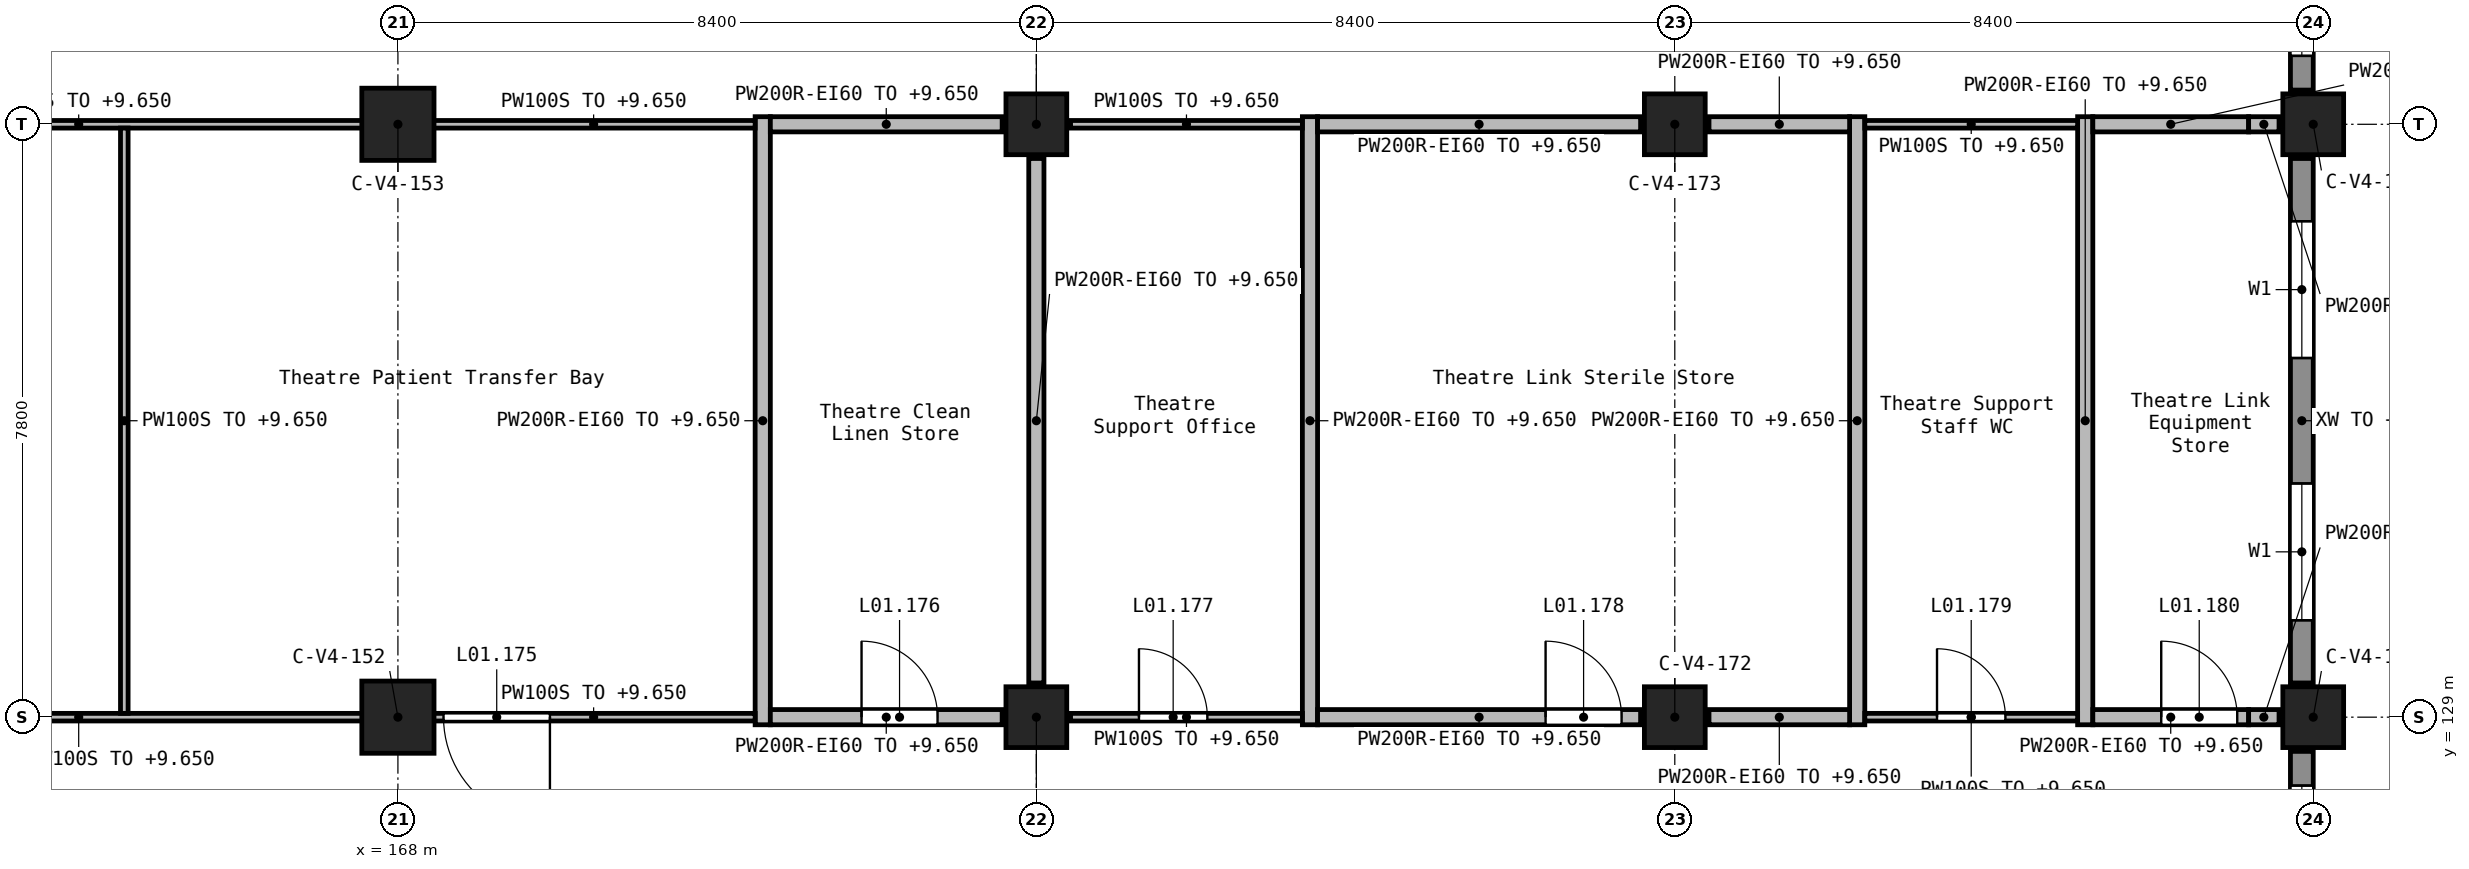
"""IFC4 building model, lengths in metres.
Left out: names, types, materials, properties, quantities, classifications, styles, units other than length and angle.
Written with IfcOpenShell. Run it as: python <this file> out.ifc"""

import sys

from ifc_helpers import new_model, si_unit, direction, frame, frame_2d, origin, origin_2d, place, context, subcontext, project, spatial, rectangle, extrude, element, fill, save


model = new_model("IFC4")
c1 = context("Model", 3, precision=1e-05, world=origin(), true_north=direction((0.0, 1.0)))
c2 = subcontext(c1, "Body", "Model", "MODEL_VIEW")
j1 = project(units=[si_unit("LENGTHUNIT", "METRE"), si_unit("PLANEANGLEUNIT", "RADIAN")], contexts=[c1])
p1 = place(None, origin())
s1 = spatial("IfcSite", under=j1, at=p1, CompositionType="ELEMENT")
p2 = place(p1, origin())
s2 = spatial("IfcBuilding", under=s1, at=p2, CompositionType="ELEMENT")
p3 = place(p2, frame((0.0, 0.0, 5.4)))
s3 = spatial("IfcBuildingStorey", under=s2, at=p3, CompositionType="ELEMENT", Elevation=5.4)
for number, where, z_axis, x_axis in (
    (1, (168.0, 129.0, 0.0), (0.0, 0.0, 1.0), (1.0, 0.0, 0.0)),
    (2, (168.0, 136.8, 0.0), (0.0, 0.0, 1.0), (1.0, 0.0, 0.0)),
):
    element("IfcColumn", number, at=place(p3, frame(where, z_axis=z_axis, x_axis=x_axis)), inside=s3, PredefinedType="COLUMN", context=c2, shape_type="SweptSolid", body=[
        extrude(rectangle(XDim=0.95, YDim=0.95, at=origin_2d()), origin(), (0.0, 0.0, 1.0), 4.5),
    ])
for number, where, z_axis, x_axis in (
    (3, (176.4, 129.0, 0.0), (0.0, 0.0, 1.0), (1.0, 0.0, 0.0)),
    (4, (176.4, 136.8, 0.0), (0.0, 0.0, 1.0), (1.0, 0.0, 0.0)),
    (5, (184.8, 129.0, 0.0), (0.0, 0.0, 1.0), (1.0, 0.0, 0.0)),
    (6, (184.8, 136.8, 0.0), (0.0, 0.0, 1.0), (1.0, 0.0, 0.0)),
    (7, (193.2, 129.0, 0.0), (0.0, 0.0, 1.0), (1.0, 0.0, 0.0)),
    (8, (193.2, 136.8, 0.0), (0.0, 0.0, 1.0), (1.0, 0.0, 0.0)),
):
    element("IfcColumn", number, at=place(p3, frame(where, z_axis=z_axis, x_axis=x_axis)), inside=s3, PredefinedType="COLUMN", context=c2, shape_type="SweptSolid", body=[
        extrude(rectangle(XDim=0.8, YDim=0.8, at=origin_2d()), origin(), (0.0, 0.0, 1.0), 4.5),
    ])
p4 = place(p3, frame((193.05, 125.85, 0.0), z_axis=(0.0, 0.0, 1.0), x_axis=(0.0, 1.0, 0.0)))
e9 = element("IfcWall", 9, at=p4, inside=s3, PredefinedType="STANDARD", context=c2, shape_type="SweptSolid", body=[
    extrude(rectangle(XDim=2.7, YDim=0.3, at=frame_2d((1.35, 0.0))), origin(), (0.0, 0.0, 1.0), 3.35),
])
p5 = place(p4, frame((0.45, 0.0, 0.9)))
e10 = element("IfcOpeningElement", 10, at=p5, cuts=e9, PredefinedType="OPENING", context=c2, shape_type="SweptSolid", body=[
    extrude(rectangle(XDim=1.8, YDim=1.5, at=frame_2d((0.9, 0.75))), frame((0.0, 0.16, 0.0), z_axis=(0.0, -1.0, 0.0), x_axis=(1.0, 0.0, 0.0)), (0.0, 0.0, 1.0), 0.32),
])
p6 = place(p3, frame((193.05, 129.45, 0.0), z_axis=(0.0, 0.0, 1.0), x_axis=(0.0, 1.0, 0.0)))
e11 = element("IfcWall", 11, at=p6, inside=s3, PredefinedType="STANDARD", context=c2, shape_type="SweptSolid", body=[
    extrude(rectangle(XDim=6.9, YDim=0.3, at=frame_2d((3.45, 0.0))), origin(), (0.0, 0.0, 1.0), 3.35),
])
p7 = place(p6, frame((0.825, 0.0, 0.9)))
e12 = element("IfcOpeningElement", 12, at=p7, cuts=e11, PredefinedType="OPENING", context=c2, shape_type="SweptSolid", body=[
    extrude(rectangle(XDim=1.8, YDim=1.5, at=frame_2d((0.9, 0.75))), frame((0.0, 0.16, 0.0), z_axis=(0.0, -1.0, 0.0), x_axis=(1.0, 0.0, 0.0)), (0.0, 0.0, 1.0), 0.32),
])
p8 = place(p6, frame((4.275, 0.0, 0.9)))
e13 = element("IfcOpeningElement", 13, at=p8, cuts=e11, PredefinedType="OPENING", context=c2, shape_type="SweptSolid", body=[
    extrude(rectangle(XDim=1.8, YDim=1.5, at=frame_2d((0.9, 0.75))), frame((0.0, 0.16, 0.0), z_axis=(0.0, -1.0, 0.0), x_axis=(1.0, 0.0, 0.0)), (0.0, 0.0, 1.0), 0.32),
])
p9 = place(p3, frame((193.05, 137.25, 0.0), z_axis=(0.0, 0.0, 1.0), x_axis=(0.0, 1.0, 0.0)))
e14 = element("IfcWall", 14, at=p9, inside=s3, PredefinedType="STANDARD", context=c2, shape_type="SweptSolid", body=[
    extrude(rectangle(XDim=2.7, YDim=0.3, at=frame_2d((1.35, 0.0))), origin(), (0.0, 0.0, 1.0), 3.35),
])
p10 = place(p9, frame((0.45, 0.0, 0.9)))
e15 = element("IfcOpeningElement", 15, at=p10, cuts=e14, PredefinedType="OPENING", context=c2, shape_type="SweptSolid", body=[
    extrude(rectangle(XDim=1.8, YDim=1.5, at=frame_2d((0.9, 0.75))), frame((0.0, 0.16, 0.0), z_axis=(0.0, -1.0, 0.0), x_axis=(1.0, 0.0, 0.0)), (0.0, 0.0, 1.0), 0.32),
])
p11 = place(p3, frame((172.8, 128.9, 0.0), z_axis=(0.0, 0.0, 1.0), x_axis=(0.0, 1.0, 0.0)))
e16 = element("IfcWall", 16, at=p11, inside=s3, PredefinedType="SOLIDWALL", context=c2, shape_type="SweptSolid", body=[
    extrude(rectangle(XDim=8.0, YDim=0.2, at=frame_2d((4.0, 0.0))), origin(), (0.0, 0.0, 1.0), 4.25),
])
p12 = place(p3, frame((176.4, 129.45, 0.0), z_axis=(0.0, 0.0, 1.0), x_axis=(0.0, 1.0, 0.0)))
e17 = element("IfcWall", 17, at=p12, inside=s3, PredefinedType="SOLIDWALL", context=c2, shape_type="SweptSolid", body=[
    extrude(rectangle(XDim=6.9, YDim=0.2, at=frame_2d((3.45, 0.0))), origin(), (0.0, 0.0, 1.0), 4.25),
])
for number, where, z_axis, x_axis in (
    (18, (180.0, 128.9, 0.0), (0.0, 0.0, 1.0), (0.0, 1.0, 0.0)),
    (19, (187.2, 128.9, 0.0), (0.0, 0.0, 1.0), (0.0, 1.0, 0.0)),
    (20, (190.2, 128.9, 0.0), (0.0, 0.0, 1.0), (0.0, 1.0, 0.0)),
):
    element("IfcWall", number, at=place(p3, frame(where, z_axis=z_axis, x_axis=x_axis)), inside=s3, PredefinedType="SOLIDWALL", context=c2, shape_type="SweptSolid", body=[
        extrude(rectangle(XDim=8.0, YDim=0.2, at=frame_2d((4.0, 0.0))), origin(), (0.0, 0.0, 1.0), 4.25),
    ])
p13 = place(p3, frame((180.1, 129.0, 0.0), z_axis=(0.0, 0.0, 1.0), x_axis=(1.0, 0.0, 0.0)))
e21 = element("IfcWall", 21, at=p13, inside=s3, PredefinedType="SOLIDWALL", context=c2, shape_type="SweptSolid", body=[
    extrude(rectangle(XDim=4.25, YDim=0.2, at=frame_2d((2.125, 0.0))), origin(), (0.0, 0.0, 1.0), 4.25),
])
p14 = place(p13, frame((3.0, 0.0, 0.0)))
e22 = element("IfcOpeningElement", 22, at=p14, cuts=e21, PredefinedType="OPENING", context=c2, shape_type="SweptSolid", body=[
    extrude(rectangle(XDim=1.0, YDim=2.1, at=frame_2d((0.5, 1.05))), frame((0.0, 0.11, 0.0), z_axis=(0.0, -1.0, 0.0), x_axis=(1.0, 0.0, 0.0)), (0.0, 0.0, 1.0), 0.22),
])
p15 = place(p3, frame((185.25, 129.0, 0.0), z_axis=(0.0, 0.0, 1.0), x_axis=(1.0, 0.0, 0.0)))
e23 = element("IfcWall", 23, at=p15, inside=s3, PredefinedType="SOLIDWALL", context=c2, shape_type="SweptSolid", body=[
    extrude(rectangle(XDim=1.85, YDim=0.2, at=frame_2d((0.925, 0.0))), origin(), (0.0, 0.0, 1.0), 4.25),
])
p16 = place(p3, frame((180.1, 136.8, 0.0), z_axis=(0.0, 0.0, 1.0), x_axis=(1.0, 0.0, 0.0)))
e24 = element("IfcWall", 24, at=p16, inside=s3, PredefinedType="SOLIDWALL", context=c2, shape_type="SweptSolid", body=[
    extrude(rectangle(XDim=4.25, YDim=0.2, at=frame_2d((2.125, 0.0))), origin(), (0.0, 0.0, 1.0), 4.25),
])
p17 = place(p3, frame((185.25, 136.8, 0.0), z_axis=(0.0, 0.0, 1.0), x_axis=(1.0, 0.0, 0.0)))
e25 = element("IfcWall", 25, at=p17, inside=s3, PredefinedType="SOLIDWALL", context=c2, shape_type="SweptSolid", body=[
    extrude(rectangle(XDim=1.85, YDim=0.2, at=frame_2d((0.925, 0.0))), origin(), (0.0, 0.0, 1.0), 4.25),
])
p18 = place(p3, frame((172.9, 129.0, 0.0), z_axis=(0.0, 0.0, 1.0), x_axis=(1.0, 0.0, 0.0)))
e26 = element("IfcWall", 26, at=p18, inside=s3, PredefinedType="SOLIDWALL", context=c2, shape_type="SweptSolid", body=[
    extrude(rectangle(XDim=3.05, YDim=0.2, at=frame_2d((1.525, 0.0))), origin(), (0.0, 0.0, 1.0), 4.25),
])
p19 = place(p18, frame((1.2, 0.0, 0.0)))
e27 = element("IfcOpeningElement", 27, at=p19, cuts=e26, PredefinedType="OPENING", context=c2, shape_type="SweptSolid", body=[
    extrude(rectangle(XDim=1.0, YDim=2.1, at=frame_2d((0.5, 1.05))), frame((0.0, 0.11, 0.0), z_axis=(0.0, -1.0, 0.0), x_axis=(1.0, 0.0, 0.0)), (0.0, 0.0, 1.0), 0.22),
])
p20 = place(p3, frame((172.9, 136.8, 0.0), z_axis=(0.0, 0.0, 1.0), x_axis=(1.0, 0.0, 0.0)))
e28 = element("IfcWall", 28, at=p20, inside=s3, PredefinedType="SOLIDWALL", context=c2, shape_type="SweptSolid", body=[
    extrude(rectangle(XDim=3.05, YDim=0.2, at=frame_2d((1.525, 0.0))), origin(), (0.0, 0.0, 1.0), 4.25),
])
p21 = place(p3, frame((190.3, 129.0, 0.0), z_axis=(0.0, 0.0, 1.0), x_axis=(1.0, 0.0, 0.0)))
e29 = element("IfcWall", 29, at=p21, inside=s3, PredefinedType="SOLIDWALL", context=c2, shape_type="SweptSolid", body=[
    extrude(rectangle(XDim=2.05, YDim=0.2, at=frame_2d((1.025, 0.0))), origin(), (0.0, 0.0, 1.0), 4.25),
])
p22 = place(p21, frame((0.9, 0.0, 0.0)))
e30 = element("IfcOpeningElement", 30, at=p22, cuts=e29, PredefinedType="OPENING", context=c2, shape_type="SweptSolid", body=[
    extrude(rectangle(XDim=1.0, YDim=2.1, at=frame_2d((0.5, 1.05))), frame((0.0, 0.11, 0.0), z_axis=(0.0, -1.0, 0.0), x_axis=(1.0, 0.0, 0.0)), (0.0, 0.0, 1.0), 0.22),
])
p23 = place(p3, frame((192.35, 129.0, 0.0), z_axis=(0.0, 0.0, 1.0), x_axis=(1.0, 0.0, 0.0)))
e31 = element("IfcWall", 31, at=p23, inside=s3, PredefinedType="SOLIDWALL", context=c2, shape_type="SweptSolid", body=[
    extrude(rectangle(XDim=0.4, YDim=0.2, at=frame_2d((0.2, 0.0))), origin(), (0.0, 0.0, 1.0), 3.33),
])
p24 = place(p3, frame((190.3, 136.8, 0.0), z_axis=(0.0, 0.0, 1.0), x_axis=(1.0, 0.0, 0.0)))
e32 = element("IfcWall", 32, at=p24, inside=s3, PredefinedType="SOLIDWALL", context=c2, shape_type="SweptSolid", body=[
    extrude(rectangle(XDim=2.05, YDim=0.2, at=frame_2d((1.025, 0.0))), origin(), (0.0, 0.0, 1.0), 4.25),
])
p25 = place(p3, frame((192.35, 136.8, 0.0), z_axis=(0.0, 0.0, 1.0), x_axis=(1.0, 0.0, 0.0)))
e33 = element("IfcWall", 33, at=p25, inside=s3, PredefinedType="SOLIDWALL", context=c2, shape_type="SweptSolid", body=[
    extrude(rectangle(XDim=0.4, YDim=0.2, at=frame_2d((0.2, 0.0))), origin(), (0.0, 0.0, 1.0), 3.33),
])
p26 = place(p3, frame((172.7, 129.0, 0.0), z_axis=(0.0, 0.0, 1.0), x_axis=(-1.0, 0.0, 0.0)))
e34 = element("IfcWall", 34, at=p26, inside=s3, PredefinedType="PARTITIONING", context=c2, shape_type="SweptSolid", body=[
    extrude(rectangle(XDim=4.25, YDim=0.1, at=frame_2d((2.125, 0.0))), origin(), (0.0, 0.0, 1.0), 4.25),
])
p27 = place(p26, frame((2.7, 0.0, 0.0)))
e35 = element("IfcOpeningElement", 35, at=p27, cuts=e34, PredefinedType="OPENING", context=c2, shape_type="SweptSolid", body=[
    extrude(rectangle(XDim=1.4, YDim=2.1, at=frame_2d((0.7, 1.05))), frame((0.0, 0.06, 0.0), z_axis=(0.0, -1.0, 0.0), x_axis=(1.0, 0.0, 0.0)), (0.0, 0.0, 1.0), 0.12),
])
p28 = place(p3, frame((167.55, 129.0, 0.0), z_axis=(0.0, 0.0, 1.0), x_axis=(-1.0, 0.0, 0.0)))
e36 = element("IfcWall", 36, at=p28, inside=s3, PredefinedType="PARTITIONING", context=c2, shape_type="SweptSolid", body=[
    extrude(rectangle(XDim=7.5, YDim=0.1, at=frame_2d((3.75, 0.0))), origin(), (0.0, 0.0, 1.0), 4.25),
])
p29 = place(p28, frame((4.65, 0.0, 0.0)))
e37 = element("IfcOpeningElement", 37, at=p29, cuts=e36, PredefinedType="OPENING", context=c2, shape_type="SweptSolid", body=[
    extrude(rectangle(XDim=1.8, YDim=2.1, at=frame_2d((0.9, 1.05))), frame((0.0, 0.06, 0.0), z_axis=(0.0, -1.0, 0.0), x_axis=(1.0, 0.0, 0.0)), (0.0, 0.0, 1.0), 0.12),
])
p30 = place(p3, frame((172.7, 136.8, 0.0), z_axis=(0.0, 0.0, 1.0), x_axis=(-1.0, 0.0, 0.0)))
e38 = element("IfcWall", 38, at=p30, inside=s3, PredefinedType="PARTITIONING", context=c2, shape_type="SweptSolid", body=[
    extrude(rectangle(XDim=4.25, YDim=0.1, at=frame_2d((2.125, 0.0))), origin(), (0.0, 0.0, 1.0), 4.25),
])
p31 = place(p3, frame((167.55, 136.8, 0.0), z_axis=(0.0, 0.0, 1.0), x_axis=(-1.0, 0.0, 0.0)))
e39 = element("IfcWall", 39, at=p31, inside=s3, PredefinedType="PARTITIONING", context=c2, shape_type="SweptSolid", body=[
    extrude(rectangle(XDim=7.5, YDim=0.1, at=frame_2d((3.75, 0.0))), origin(), (0.0, 0.0, 1.0), 4.25),
])
p32 = place(p3, frame((164.4, 129.05, 0.0), z_axis=(0.0, 0.0, 1.0), x_axis=(0.0, 1.0, 0.0)))
e40 = element("IfcWall", 40, at=p32, inside=s3, PredefinedType="PARTITIONING", context=c2, shape_type="SweptSolid", body=[
    extrude(rectangle(XDim=7.7, YDim=0.1, at=frame_2d((3.85, 0.0))), origin(), (0.0, 0.0, 1.0), 4.25),
])
p33 = place(p3, frame((176.85, 129.0, 0.0), z_axis=(0.0, 0.0, 1.0), x_axis=(1.0, 0.0, 0.0)))
e41 = element("IfcWall", 41, at=p33, inside=s3, PredefinedType="PARTITIONING", context=c2, shape_type="SweptSolid", body=[
    extrude(rectangle(XDim=3.05, YDim=0.1, at=frame_2d((1.525, 0.0))), origin(), (0.0, 0.0, 1.0), 4.25),
])
p34 = place(p33, frame((0.9, 0.0, 0.0)))
e42 = element("IfcOpeningElement", 42, at=p34, cuts=e41, PredefinedType="OPENING", context=c2, shape_type="SweptSolid", body=[
    extrude(rectangle(XDim=0.9, YDim=2.1, at=frame_2d((0.45, 1.05))), frame((0.0, 0.06, 0.0), z_axis=(0.0, -1.0, 0.0), x_axis=(1.0, 0.0, 0.0)), (0.0, 0.0, 1.0), 0.12),
])
p35 = place(p3, frame((176.85, 136.8, 0.0), z_axis=(0.0, 0.0, 1.0), x_axis=(1.0, 0.0, 0.0)))
e43 = element("IfcWall", 43, at=p35, inside=s3, PredefinedType="PARTITIONING", context=c2, shape_type="SweptSolid", body=[
    extrude(rectangle(XDim=3.05, YDim=0.1, at=frame_2d((1.525, 0.0))), origin(), (0.0, 0.0, 1.0), 4.25),
])
p36 = place(p3, frame((187.3, 129.0, 0.0), z_axis=(0.0, 0.0, 1.0), x_axis=(1.0, 0.0, 0.0)))
e44 = element("IfcWall", 44, at=p36, inside=s3, PredefinedType="PARTITIONING", context=c2, shape_type="SweptSolid", body=[
    extrude(rectangle(XDim=2.8, YDim=0.1, at=frame_2d((1.4, 0.0))), origin(), (0.0, 0.0, 1.0), 4.25),
])
p37 = place(p36, frame((0.95, 0.0, 0.0)))
e45 = element("IfcOpeningElement", 45, at=p37, cuts=e44, PredefinedType="OPENING", context=c2, shape_type="SweptSolid", body=[
    extrude(rectangle(XDim=0.9, YDim=2.1, at=frame_2d((0.45, 1.05))), frame((0.0, 0.06, 0.0), z_axis=(0.0, -1.0, 0.0), x_axis=(1.0, 0.0, 0.0)), (0.0, 0.0, 1.0), 0.12),
])
p38 = place(p3, frame((187.3, 136.8, 0.0), z_axis=(0.0, 0.0, 1.0), x_axis=(1.0, 0.0, 0.0)))
e46 = element("IfcWall", 46, at=p38, inside=s3, PredefinedType="PARTITIONING", context=c2, shape_type="SweptSolid", body=[
    extrude(rectangle(XDim=2.8, YDim=0.1, at=frame_2d((1.4, 0.0))), origin(), (0.0, 0.0, 1.0), 4.25),
])
p39 = place(p5, origin())
e47 = element("IfcWindow", 47, at=p39, inside=s3, PartitioningType="SINGLE_PANEL", PredefinedType="WINDOW", context=c2, shape_type="SweptSolid", body=[
    extrude(rectangle(XDim=1.8, YDim=1.5, at=frame_2d((0.9, 0.75))), frame((0.0, 0.03, 0.0), z_axis=(0.0, -1.0, 0.0), x_axis=(1.0, 0.0, 0.0)), (0.0, 0.0, 1.0), 0.06),
])
fill(e10, e47)
p40 = place(p7, origin())
e48 = element("IfcWindow", 48, at=p40, inside=s3, PartitioningType="SINGLE_PANEL", PredefinedType="WINDOW", context=c2, shape_type="SweptSolid", body=[
    extrude(rectangle(XDim=1.8, YDim=1.5, at=frame_2d((0.9, 0.75))), frame((0.0, 0.03, 0.0), z_axis=(0.0, -1.0, 0.0), x_axis=(1.0, 0.0, 0.0)), (0.0, 0.0, 1.0), 0.06),
])
fill(e12, e48)
p41 = place(p8, origin())
e49 = element("IfcWindow", 49, at=p41, inside=s3, PartitioningType="SINGLE_PANEL", PredefinedType="WINDOW", context=c2, shape_type="SweptSolid", body=[
    extrude(rectangle(XDim=1.8, YDim=1.5, at=frame_2d((0.9, 0.75))), frame((0.0, 0.03, 0.0), z_axis=(0.0, -1.0, 0.0), x_axis=(1.0, 0.0, 0.0)), (0.0, 0.0, 1.0), 0.06),
])
fill(e13, e49)
p42 = place(p10, origin())
e50 = element("IfcWindow", 50, at=p42, inside=s3, PartitioningType="SINGLE_PANEL", PredefinedType="WINDOW", context=c2, shape_type="SweptSolid", body=[
    extrude(rectangle(XDim=1.8, YDim=1.5, at=frame_2d((0.9, 0.75))), frame((0.0, 0.03, 0.0), z_axis=(0.0, -1.0, 0.0), x_axis=(1.0, 0.0, 0.0)), (0.0, 0.0, 1.0), 0.06),
])
fill(e15, e50)
p43 = place(p27, frame((1.4, 0.0, 0.0), z_axis=(0.0, 0.0, 1.0), x_axis=(-1.0, 0.0, 0.0)))
e51 = element("IfcDoor", 51, at=p43, inside=s3, OperationType="DOUBLE_DOOR_SINGLE_SWING", PredefinedType="DOOR", context=c2, shape_type="SweptSolid", body=[
    extrude(rectangle(XDim=1.4, YDim=2.1, at=frame_2d((0.7, 1.05))), frame((0.0, 0.025, 0.0), z_axis=(0.0, -1.0, 0.0), x_axis=(1.0, 0.0, 0.0)), (0.0, 0.0, 1.0), 0.05),
])
fill(e35, e51)
p44 = place(p19, origin())
e52 = element("IfcDoor", 52, at=p44, inside=s3, OperationType="SINGLE_SWING_RIGHT", PredefinedType="DOOR", context=c2, shape_type="SweptSolid", body=[
    extrude(rectangle(XDim=1.0, YDim=2.1, at=frame_2d((0.5, 1.05))), frame((0.0, 0.025, 0.0), z_axis=(0.0, -1.0, 0.0), x_axis=(1.0, 0.0, 0.0)), (0.0, 0.0, 1.0), 0.05),
])
fill(e27, e52)
p45 = place(p34, origin())
e53 = element("IfcDoor", 53, at=p45, inside=s3, OperationType="SINGLE_SWING_LEFT", PredefinedType="DOOR", context=c2, shape_type="SweptSolid", body=[
    extrude(rectangle(XDim=0.9, YDim=2.1, at=frame_2d((0.45, 1.05))), frame((0.0, 0.025, 0.0), z_axis=(0.0, -1.0, 0.0), x_axis=(1.0, 0.0, 0.0)), (0.0, 0.0, 1.0), 0.05),
])
fill(e42, e53)
p46 = place(p14, origin())
e54 = element("IfcDoor", 54, at=p46, inside=s3, OperationType="SINGLE_SWING_RIGHT", PredefinedType="DOOR", context=c2, shape_type="SweptSolid", body=[
    extrude(rectangle(XDim=1.0, YDim=2.1, at=frame_2d((0.5, 1.05))), frame((0.0, 0.025, 0.0), z_axis=(0.0, -1.0, 0.0), x_axis=(1.0, 0.0, 0.0)), (0.0, 0.0, 1.0), 0.05),
])
fill(e22, e54)
p47 = place(p37, origin())
e55 = element("IfcDoor", 55, at=p47, inside=s3, OperationType="SINGLE_SWING_RIGHT", PredefinedType="DOOR", context=c2, shape_type="SweptSolid", body=[
    extrude(rectangle(XDim=0.9, YDim=2.1, at=frame_2d((0.45, 1.05))), frame((0.0, 0.025, 0.0), z_axis=(0.0, -1.0, 0.0), x_axis=(1.0, 0.0, 0.0)), (0.0, 0.0, 1.0), 0.05),
])
fill(e45, e55)
p48 = place(p22, origin())
e56 = element("IfcDoor", 56, at=p48, inside=s3, OperationType="SINGLE_SWING_RIGHT", PredefinedType="DOOR", context=c2, shape_type="SweptSolid", body=[
    extrude(rectangle(XDim=1.0, YDim=2.1, at=frame_2d((0.5, 1.05))), frame((0.0, 0.025, 0.0), z_axis=(0.0, -1.0, 0.0), x_axis=(1.0, 0.0, 0.0)), (0.0, 0.0, 1.0), 0.05),
])
fill(e30, e56)
save(model, sys.argv[1])
